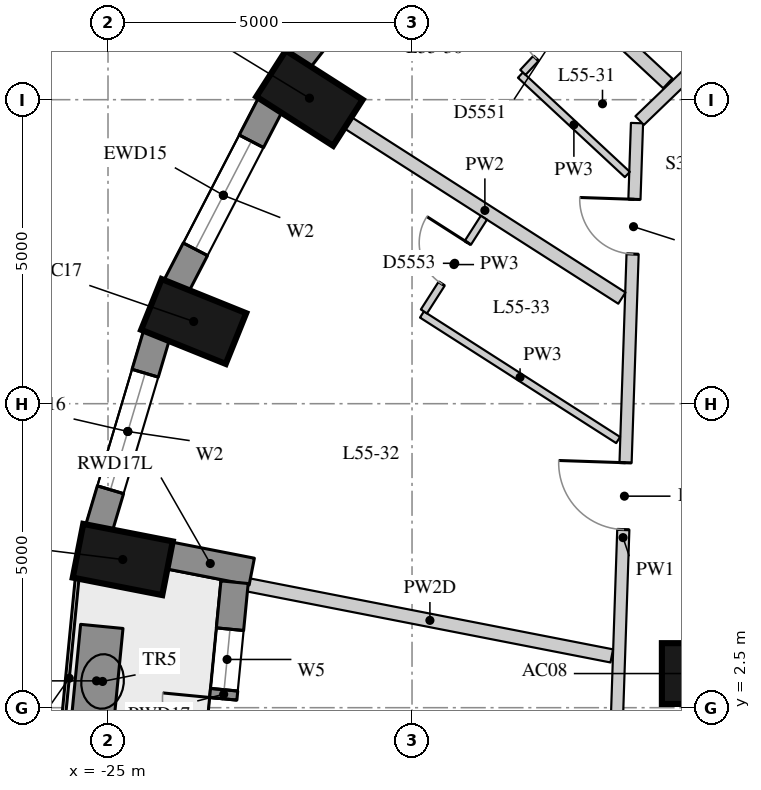
"""IFC4 building model, lengths in metres.
Left out: names, types, materials, properties, quantities, classifications, styles, units other than length and angle.
Written with IfcOpenShell. Run it as: python <this file> out.ifc"""

import sys

from ifc_helpers import new_model, si_unit, direction, frame, frame_2d, origin, origin_2d, place, context, subcontext, project, spatial, rectangle, extrude, element, fill, save


model = new_model("IFC4")
c1 = context("Model", 3, precision=1e-05, world=origin(), true_north=direction((0.0, 1.0)))
c2 = subcontext(c1, "Body", "Model", "MODEL_VIEW")
j1 = project(units=[si_unit("LENGTHUNIT", "METRE"), si_unit("PLANEANGLEUNIT", "RADIAN")], contexts=[c1])
p1 = place(None, origin())
s1 = spatial("IfcSite", under=j1, at=p1, CompositionType="ELEMENT")
p2 = place(p1, origin())
s2 = spatial("IfcBuilding", under=s1, at=p2, CompositionType="ELEMENT")
p3 = place(p2, frame((0.0, 0.0, 195.8)))
s3 = spatial("IfcBuildingStorey", under=s2, at=p3, CompositionType="ELEMENT", Elevation=195.8)
for number, where, z_axis, x_axis in (
    (1, (-21.687, 12.525, 0.0), (0.0, 0.0, 1.0), (-0.842, 0.539, 0.0)),
    (2, (-23.591, 8.852, 0.0), (0.0, 0.0, 1.0), (-0.927, 0.374, 0.0)),
    (3, (-24.757, 4.937, 0.0), (0.0, 0.0, 1.0), (-0.981, 0.192, 0.0)),
):
    element("IfcColumn", number, at=place(p3, frame(where, z_axis=z_axis, x_axis=x_axis)), inside=s3, PredefinedType="COLUMN", context=c2, shape_type="SweptSolid", body=[
        extrude(rectangle(XDim=1.5, YDim=0.9, at=origin_2d()), origin(), (0.0, 0.0, 1.0), 3.3),
    ])
p4 = place(p3, frame((-15.391, 3.062, 0.0), z_axis=(0.0, 0.0, 1.0), x_axis=(1.0, 0.0, 0.0)))
e4 = element("IfcColumn", 4, at=p4, inside=s3, PredefinedType="COLUMN", context=c2, shape_type="SweptSolid", body=[
    extrude(rectangle(XDim=1.0, YDim=1.0, at=origin_2d()), origin(), (0.0, 0.0, 1.0), 3.3),
])
p5 = place(p3, frame((-19.751, 15.861, 0.0), z_axis=(0.0, 0.0, 1.0), x_axis=(-0.614220816451, -0.789134201919, 0.0)))
e5 = element("IfcWall", 5, at=p5, inside=s3, PredefinedType="SOLIDWALL", context=c2, shape_type="SweptSolid", body=[
    extrude(rectangle(XDim=3.438, YDim=0.45, at=frame_2d((1.719, 0.0))), origin(), (0.0, 0.0, 1.0), 3.02),
])
p6 = place(p5, frame((0.719, 0.0, 0.4)))
e6 = element("IfcOpeningElement", 6, at=p6, cuts=e5, PredefinedType="OPENING", context=c2, shape_type="SweptSolid", body=[
    extrude(rectangle(XDim=2.0, YDim=1.75, at=frame_2d((1.0, 0.875))), frame((0.0, 0.235, 0.0), z_axis=(0.0, -1.0, 0.0), x_axis=(1.0, 0.0, 0.0)), (0.0, 0.0, 1.0), 0.47),
])
p7 = place(p3, frame((-22.327, 12.424, 0.0), z_axis=(0.0, 0.0, 1.0), x_axis=(-0.460232593174, -0.887798378113, 0.0)))
e7 = element("IfcWall", 7, at=p7, inside=s3, PredefinedType="SOLIDWALL", context=c2, shape_type="SweptSolid", body=[
    extrude(rectangle(XDim=3.371, YDim=0.45, at=frame_2d((1.685, 0.0))), origin(), (0.0, 0.0, 1.0), 3.02),
])
p8 = place(p7, frame((0.685, 0.0, 0.4)))
e8 = element("IfcOpeningElement", 8, at=p8, cuts=e7, PredefinedType="OPENING", context=c2, shape_type="SweptSolid", body=[
    extrude(rectangle(XDim=2.0, YDim=1.75, at=frame_2d((1.0, 0.875))), frame((0.0, 0.235, 0.0), z_axis=(0.0, -1.0, 0.0), x_axis=(1.0, 0.0, 0.0)), (0.0, 0.0, 1.0), 0.47),
])
p9 = place(p3, frame((-24.2, 8.634, 0.0), z_axis=(0.0, 0.0, 1.0), x_axis=(-0.285444972963, -0.958395099847, 0.0)))
e9 = element("IfcWall", 9, at=p9, inside=s3, PredefinedType="SOLIDWALL", context=c2, shape_type="SweptSolid", body=[
    extrude(rectangle(XDim=3.32, YDim=0.45, at=frame_2d((1.66, 0.0))), origin(), (0.0, 0.0, 1.0), 3.02),
])
p10 = place(p9, frame((0.66, 0.0, 0.4)))
e10 = element("IfcOpeningElement", 10, at=p10, cuts=e9, PredefinedType="OPENING", context=c2, shape_type="SweptSolid", body=[
    extrude(rectangle(XDim=2.0, YDim=1.75, at=frame_2d((1.0, 0.875))), frame((0.0, 0.235, 0.0), z_axis=(0.0, -1.0, 0.0), x_axis=(1.0, 0.0, 0.0)), (0.0, 0.0, 1.0), 0.47),
])
p11 = place(p3, frame((-24.0, 5.005, 0.0), z_axis=(0.0, 0.0, 1.0), x_axis=(0.981402725872, -0.191960125157, 0.0)))
e11 = element("IfcWall", 11, at=p11, inside=s3, PredefinedType="SOLIDWALL", context=c2, shape_type="SweptSolid", body=[
    extrude(rectangle(XDim=1.39, YDim=0.45, at=frame_2d((0.695, 0.0))), origin(), (0.0, 0.0, 1.0), 2.47),
])
p12 = place(p3, frame((-22.919, 4.564, 0.0), z_axis=(0.0, 0.0, 1.0), x_axis=(-0.096520145037, -0.995331031166, 0.0)))
e12 = element("IfcWall", 12, at=p12, inside=s3, PredefinedType="SOLIDWALL", context=c2, shape_type="SweptSolid", body=[
    extrude(rectangle(XDim=3.703, YDim=0.45, at=frame_2d((1.852, 0.0))), origin(), (0.0, 0.0, 1.0), 3.02),
])
p13 = place(p12, frame((0.776, 0.0, 0.4)))
e13 = element("IfcOpeningElement", 13, at=p13, cuts=e12, PredefinedType="OPENING", context=c2, shape_type="SweptSolid", body=[
    extrude(rectangle(XDim=1.0, YDim=1.75, at=frame_2d((0.5, 0.875))), frame((0.0, 0.235, 0.0), z_axis=(0.0, -1.0, 0.0), x_axis=(1.0, 0.0, 0.0)), (0.0, 0.0, 1.0), 0.47),
])
p14 = place(p12, frame((1.927, 0.0, 0.0)))
e14 = element("IfcOpeningElement", 14, at=p14, cuts=e12, PredefinedType="OPENING", context=c2, shape_type="SweptSolid", body=[
    extrude(rectangle(XDim=1.0, YDim=2.15, at=frame_2d((0.5, 1.075))), frame((0.0, 0.235, 0.0), z_axis=(0.0, -1.0, 0.0), x_axis=(1.0, 0.0, 0.0)), (0.0, 0.0, 1.0), 0.47),
])
p15 = place(p3, frame((-25.102, 3.837, 0.0), z_axis=(0.0, 0.0, 1.0), x_axis=(-0.096696932894, -0.995313871685, 0.0)))
e15 = element("IfcWall", 15, at=p15, inside=s3, PredefinedType="USERDEFINED", context=c2, shape_type="SweptSolid", body=[
    extrude(rectangle(XDim=1.8, YDim=0.7, at=frame_2d((0.9, 0.0))), origin(), (0.0, 0.0, 1.0), 0.75),
])
p16 = place(p3, frame((-16.76, -1.521, 0.0), z_axis=(0.0, 0.0, 1.0), x_axis=(0.033695560079, 0.999432143385, 0.0)))
e16 = element("IfcWall", 16, at=p16, inside=s3, PredefinedType="PARTITIONING", context=c2, shape_type="SweptSolid", body=[
    extrude(rectangle(XDim=13.643, YDim=0.2, at=frame_2d((6.822, 0.0))), origin(), (0.0, 0.0, 1.0), 3.02),
])
p17 = place(p16, frame((11.489, 0.0, 0.0)))
e17 = element("IfcOpeningElement", 17, at=p17, cuts=e16, PredefinedType="OPENING", context=c2, shape_type="SweptSolid", body=[
    extrude(rectangle(XDim=0.9, YDim=2.1, at=frame_2d((0.45, 1.05))), frame((0.0, 0.11, 0.0), z_axis=(0.0, -1.0, 0.0), x_axis=(1.0, 0.0, 0.0)), (0.0, 0.0, 1.0), 0.22),
])
p18 = place(p16, frame((6.954, 0.0, 0.0)))
e18 = element("IfcOpeningElement", 18, at=p18, cuts=e16, PredefinedType="OPENING", context=c2, shape_type="SweptSolid", body=[
    extrude(rectangle(XDim=1.1, YDim=2.1, at=frame_2d((0.55, 1.05))), frame((0.0, 0.11, 0.0), z_axis=(0.0, -1.0, 0.0), x_axis=(1.0, 0.0, 0.0)), (0.0, 0.0, 1.0), 0.22),
])
p19 = place(p16, frame((2.39, 0.0, 0.0)))
e19 = element("IfcOpeningElement", 19, at=p19, cuts=e16, PredefinedType="OPENING", context=c2, shape_type="SweptSolid", body=[
    extrude(rectangle(XDim=0.9, YDim=2.1, at=frame_2d((0.45, 1.05))), frame((0.0, 0.11, 0.0), z_axis=(0.0, -1.0, 0.0), x_axis=(1.0, 0.0, 0.0)), (0.0, 0.0, 1.0), 0.22),
])
p20 = place(p3, frame((-16.257, 12.157, 0.0), z_axis=(0.0, 0.0, 1.0), x_axis=(0.720356671174, 0.693603825174, 0.0)))
e20 = element("IfcWall", 20, at=p20, inside=s3, PredefinedType="PARTITIONING", context=c2, shape_type="SweptSolid", body=[
    extrude(rectangle(XDim=2.354, YDim=0.2, at=frame_2d((1.177, 0.0))), origin(), (0.0, 0.0, 1.0), 3.02),
])
p21 = place(p3, frame((-18.553, 15.334, 0.0), z_axis=(0.0, 0.0, 1.0), x_axis=(0.732303975018, -0.680977891105, 0.0)))
e21 = element("IfcWall", 21, at=p21, inside=s3, PredefinedType="PARTITIONING", context=c2, shape_type="SweptSolid", body=[
    extrude(rectangle(XDim=3.767, YDim=0.22, at=frame_2d((1.884, 0.0))), origin(), (0.0, 0.0, 1.0), 2.57),
])
p22 = place(p3, frame((-21.055, 12.121, 0.0), z_axis=(0.0, 0.0, 1.0), x_axis=(0.842281345898, -0.539038156675, 0.0)))
e22 = element("IfcWall", 22, at=p22, inside=s3, PredefinedType="PARTITIONING", context=c2, shape_type="SweptSolid", body=[
    extrude(rectangle(XDim=5.35, YDim=0.22, at=frame_2d((2.675, 0.0))), origin(), (0.0, 0.0, 1.0), 3.02),
])
p23 = place(p3, frame((-22.697, 4.521, 0.0), z_axis=(0.0, 0.0, 1.0), x_axis=(0.981441525081, -0.19176165635, 0.0)))
e23 = element("IfcWall", 23, at=p23, inside=s3, PredefinedType="PARTITIONING", context=c2, shape_type="SweptSolid", body=[
    extrude(rectangle(XDim=6.094, YDim=0.22, at=frame_2d((3.047, 0.0))), origin(), (0.0, 0.0, 1.0), 2.47),
])
p24 = place(p3, frame((-16.459, 11.27, 0.0), z_axis=(0.0, 0.0, 1.0), x_axis=(-0.732311710068, 0.68096957296, 0.0)))
e24 = element("IfcWall", 24, at=p24, inside=s3, PredefinedType="PARTITIONING", context=c2, shape_type="SweptSolid", body=[
    extrude(rectangle(XDim=2.401, YDim=0.12, at=frame_2d((1.201, 0.0))), origin(), (0.0, 0.0, 1.0), 3.02),
])
p25 = place(p3, frame((-16.61, 6.902, 0.0), z_axis=(0.0, 0.0, 1.0), x_axis=(-0.842288763401, 0.539026566181, 0.0)))
e25 = element("IfcWall", 25, at=p25, inside=s3, PredefinedType="PARTITIONING", context=c2, shape_type="SweptSolid", body=[
    extrude(rectangle(XDim=3.83, YDim=0.12, at=frame_2d((1.915, 0.0))), origin(), (0.0, 0.0, 1.0), 3.02),
])
p26 = place(p3, frame((-18.177, 12.949, 0.0), z_axis=(0.0, 0.0, 1.0), x_axis=(0.681081886823, 0.732207254431, 0.0)))
e26 = element("IfcWall", 26, at=p26, inside=s3, PredefinedType="PARTITIONING", context=c2, shape_type="SweptSolid", body=[
    extrude(rectangle(XDim=1.38, YDim=0.12, at=frame_2d((0.69, 0.0))), origin(), (0.0, 0.0, 1.0), 3.02),
])
p27 = place(p26, frame((0.315, 0.0, 0.0)))
e27 = element("IfcOpeningElement", 27, at=p27, cuts=e26, PredefinedType="OPENING", context=c2, shape_type="SweptSolid", body=[
    extrude(rectangle(XDim=0.8, YDim=2.1, at=frame_2d((0.4, 1.05))), frame((0.0, 0.07, 0.0), z_axis=(0.0, -1.0, 0.0), x_axis=(1.0, 0.0, 0.0)), (0.0, 0.0, 1.0), 0.14),
])
p28 = place(p3, frame((-19.804, 9.017, 0.0), z_axis=(0.0, 0.0, 1.0), x_axis=(0.538962837458, 0.842329543492, 0.0)))
e28 = element("IfcWall", 28, at=p28, inside=s3, PredefinedType="PARTITIONING", context=c2, shape_type="SweptSolid", body=[
    extrude(rectangle(XDim=1.83, YDim=0.12, at=frame_2d((0.915, 0.0))), origin(), (0.0, 0.0, 1.0), 3.02),
])
p29 = place(p28, frame((0.54, 0.0, 0.0)))
e29 = element("IfcOpeningElement", 29, at=p29, cuts=e28, PredefinedType="OPENING", context=c2, shape_type="SweptSolid", body=[
    extrude(rectangle(XDim=0.8, YDim=2.1, at=frame_2d((0.4, 1.05))), frame((0.0, 0.07, 0.0), z_axis=(0.0, -1.0, 0.0), x_axis=(1.0, 0.0, 0.0)), (0.0, 0.0, 1.0), 0.14),
])
p30 = place(p8, origin())
e30 = element("IfcWindow", 30, at=p30, inside=s3, PartitioningType="SINGLE_PANEL", PredefinedType="WINDOW", context=c2, shape_type="SweptSolid", body=[
    extrude(rectangle(XDim=2.0, YDim=1.75, at=frame_2d((1.0, 0.875))), frame((0.0, 0.035, 0.0), z_axis=(0.0, -1.0, 0.0), x_axis=(1.0, 0.0, 0.0)), (0.0, 0.0, 1.0), 0.06),
])
fill(e8, e30)
p31 = place(p10, origin())
e31 = element("IfcWindow", 31, at=p31, inside=s3, PartitioningType="SINGLE_PANEL", PredefinedType="WINDOW", context=c2, shape_type="SweptSolid", body=[
    extrude(rectangle(XDim=2.0, YDim=1.75, at=frame_2d((1.0, 0.875))), frame((0.0, 0.035, 0.0), z_axis=(0.0, -1.0, 0.0), x_axis=(1.0, 0.0, 0.0)), (0.0, 0.0, 1.0), 0.06),
])
fill(e10, e31)
p32 = place(p13, origin())
e32 = element("IfcWindow", 32, at=p32, inside=s3, PartitioningType="SINGLE_PANEL", PredefinedType="WINDOW", context=c2, shape_type="SweptSolid", body=[
    extrude(rectangle(XDim=1.0, YDim=1.75, at=frame_2d((0.5, 0.875))), frame((0.0, 0.035, 0.0), z_axis=(0.0, -1.0, 0.0), x_axis=(1.0, 0.0, 0.0)), (0.0, 0.0, 1.0), 0.06),
])
fill(e13, e32)
p33 = place(p14, frame((1.0, 0.0, 0.0), z_axis=(0.0, 0.0, 1.0), x_axis=(-1.0, 0.0, 0.0)))
e33 = element("IfcDoor", 33, at=p33, inside=s3, OperationType="SINGLE_SWING_RIGHT", PredefinedType="DOOR", context=c2, shape_type="SweptSolid", body=[
    extrude(rectangle(XDim=1.0, YDim=2.15, at=frame_2d((0.5, 1.075))), frame((0.0, 0.075, 0.0), z_axis=(0.0, -1.0, 0.0), x_axis=(1.0, 0.0, 0.0)), (0.0, 0.0, 1.0), 0.05),
])
fill(e14, e33)
p34 = place(p17, origin())
e34 = element("IfcDoor", 34, at=p34, inside=s3, OperationType="SINGLE_SWING_RIGHT", PredefinedType="DOOR", context=c2, shape_type="SweptSolid", body=[
    extrude(rectangle(XDim=0.9, YDim=2.1, at=frame_2d((0.45, 1.05))), frame((0.0, 0.025, 0.0), z_axis=(0.0, -1.0, 0.0), x_axis=(1.0, 0.0, 0.0)), (0.0, 0.0, 1.0), 0.05),
])
fill(e17, e34)
p35 = place(p27, origin())
e35 = element("IfcDoor", 35, at=p35, inside=s3, OperationType="SINGLE_SWING_RIGHT", PredefinedType="DOOR", context=c2, shape_type="SweptSolid", body=[
    extrude(rectangle(XDim=0.8, YDim=2.1, at=frame_2d((0.4, 1.05))), frame((0.0, 0.025, 0.0), z_axis=(0.0, -1.0, 0.0), x_axis=(1.0, 0.0, 0.0)), (0.0, 0.0, 1.0), 0.05),
])
fill(e27, e35)
p36 = place(p18, origin())
e36 = element("IfcDoor", 36, at=p36, inside=s3, OperationType="SINGLE_SWING_RIGHT", PredefinedType="DOOR", context=c2, shape_type="SweptSolid", body=[
    extrude(rectangle(XDim=1.1, YDim=2.1, at=frame_2d((0.55, 1.05))), frame((0.0, 0.025, 0.0), z_axis=(0.0, -1.0, 0.0), x_axis=(1.0, 0.0, 0.0)), (0.0, 0.0, 1.0), 0.05),
])
fill(e18, e36)
p37 = place(p29, origin())
e37 = element("IfcDoor", 37, at=p37, inside=s3, OperationType="SINGLE_SWING_RIGHT", PredefinedType="DOOR", context=c2, shape_type="SweptSolid", body=[
    extrude(rectangle(XDim=0.8, YDim=2.1, at=frame_2d((0.4, 1.05))), frame((0.0, 0.025, 0.0), z_axis=(0.0, -1.0, 0.0), x_axis=(1.0, 0.0, 0.0)), (0.0, 0.0, 1.0), 0.05),
])
fill(e29, e37)
save(model, sys.argv[1])
